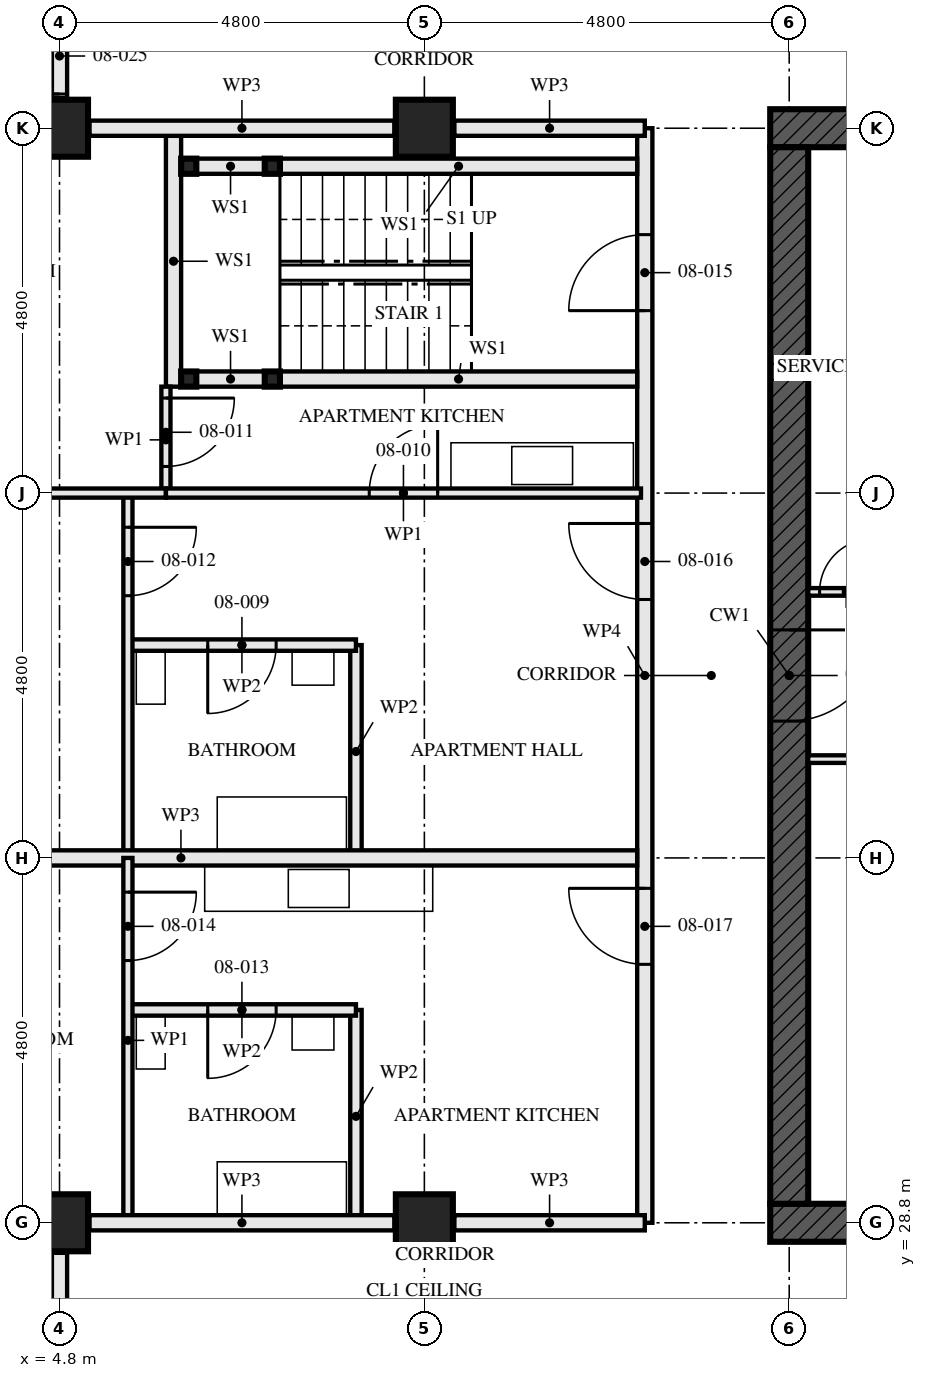
"""IFC4 building model, lengths in metres.
Left out: names, types, materials, properties, quantities, classifications, styles, units other than length and angle.
Written with IfcOpenShell. Run it as: python <this file> out.ifc"""

import sys

from ifc_helpers import new_model, si_unit, direction, frame, frame_2d, origin, origin_2d, place, context, subcontext, project, spatial, rectangle, hollow_rectangle, extrude, element, fill, save


model = new_model("IFC4")
c1 = context("Model", 3, precision=1e-05, world=origin(), true_north=direction((0.0, 1.0)))
c2 = subcontext(c1, "Body", "Model", "MODEL_VIEW")
j1 = project(units=[si_unit("LENGTHUNIT", "METRE"), si_unit("PLANEANGLEUNIT", "RADIAN")], contexts=[c1])
p1 = place(None, origin())
s1 = spatial("IfcSite", under=j1, at=p1, CompositionType="ELEMENT")
p2 = place(p1, origin())
s2 = spatial("IfcBuilding", under=s1, at=p2, CompositionType="ELEMENT")
p3 = place(p2, frame((0.0, 0.0, 34.0)))
s3 = spatial("IfcBuildingStorey", under=s2, at=p3, CompositionType="ELEMENT", Elevation=34.0)
for number, where, z_axis, x_axis in (
    (1, (4.8, 28.8, 0.0), (0.0, 0.0, 1.0), (0.0, 1.0, 0.0)),
    (2, (4.8, 43.2, 0.0), (0.0, 0.0, 1.0), (0.0, 1.0, 0.0)),
    (3, (9.6, 28.8, 0.0), (0.0, 0.0, 1.0), (0.0, 1.0, 0.0)),
    (4, (9.6, 43.2, 0.0), (0.0, 0.0, 1.0), (0.0, 1.0, 0.0)),
):
    element("IfcColumn", number, at=place(p3, frame(where, z_axis=z_axis, x_axis=x_axis)), inside=s3, PredefinedType="COLUMN", context=c2, shape_type="SweptSolid", body=[
        extrude(hollow_rectangle(XDim=0.75, YDim=0.75, WallThickness=0.08, at=origin_2d()), origin(), (0.0, 0.0, 1.0), 3.5),
    ])
p4 = place(p3, frame((14.15, 28.8, -0.17), z_axis=(0.0, 0.0, 1.0), x_axis=(1.0, 0.0, 0.0)))
e5 = element("IfcWall", 5, at=p4, inside=s3, PredefinedType="SHEAR", context=c2, shape_type="SweptSolid", body=[
    extrude(rectangle(XDim=14.9, YDim=0.5, at=frame_2d((7.45, 0.0))), origin(), (0.0, 0.0, 1.0), 3.5),
])
p5 = place(p4, frame((6.85, 0.0, 0.17)))
e6 = element("IfcOpeningElement", 6, at=p5, cuts=e5, PredefinedType="OPENING", context=c2, shape_type="SweptSolid", body=[
    extrude(rectangle(XDim=1.2, YDim=2.1, at=frame_2d((0.6, 1.05))), frame((0.0, 0.26, 0.0), z_axis=(0.0, -1.0, 0.0), x_axis=(1.0, 0.0, 0.0)), (0.0, 0.0, 1.0), 0.521),
])
p6 = place(p3, frame((29.05, 43.2, -0.17), z_axis=(0.0, 0.0, 1.0), x_axis=(-1.0, 0.0, 0.0)))
e7 = element("IfcWall", 7, at=p6, inside=s3, PredefinedType="SHEAR", context=c2, shape_type="SweptSolid", body=[
    extrude(rectangle(XDim=14.9, YDim=0.5, at=frame_2d((7.45, 0.0))), origin(), (0.0, 0.0, 1.0), 3.5),
])
p7 = place(p6, frame((6.85, 0.0, 0.17)))
e8 = element("IfcOpeningElement", 8, at=p7, cuts=e7, PredefinedType="OPENING", context=c2, shape_type="SweptSolid", body=[
    extrude(rectangle(XDim=1.2, YDim=2.1, at=frame_2d((0.6, 1.05))), frame((0.0, 0.26, 0.0), z_axis=(0.0, -1.0, 0.0), x_axis=(1.0, 0.0, 0.0)), (0.0, 0.0, 1.0), 0.521),
])
p8 = place(p3, frame((14.4, 42.95, -0.17), z_axis=(0.0, 0.0, 1.0), x_axis=(0.0, -1.0, 0.0)))
e9 = element("IfcWall", 9, at=p8, inside=s3, PredefinedType="SHEAR", context=c2, shape_type="SweptSolid", body=[
    extrude(rectangle(XDim=13.9, YDim=0.5, at=frame_2d((6.95, 0.0))), origin(), (0.0, 0.0, 1.0), 3.5),
])
p9 = place(p8, frame((6.35, 0.0, 0.17)))
e10 = element("IfcOpeningElement", 10, at=p9, cuts=e9, PredefinedType="OPENING", context=c2, shape_type="SweptSolid", body=[
    extrude(rectangle(XDim=1.2, YDim=2.1, at=frame_2d((0.6, 1.05))), frame((0.0, 0.26, 0.0), z_axis=(0.0, -1.0, 0.0), x_axis=(1.0, 0.0, 0.0)), (0.0, 0.0, 1.0), 0.521),
])
for number, where, z_axis, x_axis in (
    (11, (6.5, 42.7, 0.0), (0.0, 0.0, 1.0), (1.0, 0.0, 0.0)),
    (12, (6.5, 39.9, 0.0), (0.0, 0.0, 1.0), (1.0, 0.0, 0.0)),
    (13, (7.6, 42.7, 0.0), (0.0, 0.0, 1.0), (1.0, 0.0, 0.0)),
    (14, (7.6, 39.9, 0.0), (0.0, 0.0, 1.0), (1.0, 0.0, 0.0)),
):
    element("IfcColumn", number, at=place(p3, frame(where, z_axis=z_axis, x_axis=x_axis)), inside=s3, PredefinedType="COLUMN", context=c2, shape_type="SweptSolid", body=[
        extrude(hollow_rectangle(XDim=0.2, YDim=0.2, WallThickness=0.008, at=origin_2d()), origin(), (0.0, 0.0, 1.0), 3.33),
    ])
p10 = place(p3, frame((4.8, 26.8, 0.0), z_axis=(0.0, 0.0, 1.0), x_axis=(0.0, 1.0, 0.0)))
e15 = element("IfcWall", 15, at=p10, inside=s3, PredefinedType="PARTITIONING", context=c2, shape_type="SweptSolid", body=[
    extrude(rectangle(XDim=1.605, YDim=0.2, at=frame_2d((0.802, 0.0))), origin(), (0.0, 0.0, 1.0), 3.33),
])
p11 = place(p3, frame((6.6, 42.7, 0.0), z_axis=(0.0, 0.0, 1.0), x_axis=(1.0, 0.0, 0.0)))
e16 = element("IfcWall", 16, at=p11, inside=s3, PredefinedType="SOLIDWALL", context=c2, shape_type="SweptSolid", body=[
    extrude(rectangle(XDim=0.9, YDim=0.2, at=frame_2d((0.45, 0.0))), origin(), (0.0, 0.0, 1.0), 2.99),
])
p12 = place(p3, frame((7.7, 42.7, 0.0), z_axis=(0.0, 0.0, 1.0), x_axis=(1.0, 0.0, 0.0)))
e17 = element("IfcWall", 17, at=p12, inside=s3, PredefinedType="SOLIDWALL", context=c2, shape_type="SweptSolid", body=[
    extrude(rectangle(XDim=4.7, YDim=0.2, at=frame_2d((2.35, 0.0))), origin(), (0.0, 0.0, 1.0), 2.99),
])
p13 = place(p3, frame((6.6, 39.9, 0.0), z_axis=(0.0, 0.0, 1.0), x_axis=(1.0, 0.0, 0.0)))
e18 = element("IfcWall", 18, at=p13, inside=s3, PredefinedType="SOLIDWALL", context=c2, shape_type="SweptSolid", body=[
    extrude(rectangle(XDim=0.9, YDim=0.2, at=frame_2d((0.45, 0.0))), origin(), (0.0, 0.0, 1.0), 2.99),
])
p14 = place(p3, frame((7.7, 39.9, 0.0), z_axis=(0.0, 0.0, 1.0), x_axis=(1.0, 0.0, 0.0)))
e19 = element("IfcWall", 19, at=p14, inside=s3, PredefinedType="SOLIDWALL", context=c2, shape_type="SweptSolid", body=[
    extrude(rectangle(XDim=4.7, YDim=0.2, at=frame_2d((2.35, 0.0))), origin(), (0.0, 0.0, 1.0), 2.99),
])
p15 = place(p3, frame((6.3, 43.1, 0.0), z_axis=(0.0, 0.0, 1.0), x_axis=(0.0, -1.0, 0.0)))
e20 = element("IfcWall", 20, at=p15, inside=s3, PredefinedType="SOLIDWALL", context=c2, shape_type="SweptSolid", body=[
    extrude(rectangle(XDim=3.3, YDim=0.2, at=frame_2d((1.65, 0.0))), origin(), (0.0, 0.0, 1.0), 3.33),
])
p16 = place(p3, frame((5.7, 36.4, 0.0), z_axis=(0.0, 0.0, 1.0), x_axis=(1.0, 0.0, 0.0)))
e21 = element("IfcWall", 21, at=p16, inside=s3, PredefinedType="PARTITIONING", context=c2, shape_type="SweptSolid", body=[
    extrude(rectangle(XDim=3.0, YDim=0.15, at=frame_2d((1.5, 0.0))), origin(), (0.0, 0.0, 1.0), 3.33),
])
p17 = place(p16, frame((1.05, 0.0, 0.0)))
e22 = element("IfcOpeningElement", 22, at=p17, cuts=e21, PredefinedType="OPENING", context=c2, shape_type="SweptSolid", body=[
    extrude(rectangle(XDim=0.9, YDim=2.1, at=frame_2d((0.45, 1.05))), frame((0.0, 0.085, 0.0), z_axis=(0.0, -1.0, 0.0), x_axis=(1.0, 0.0, 0.0)), (0.0, 0.0, 1.0), 0.171),
])
p18 = place(p3, frame((8.7, 36.4, 0.0), z_axis=(0.0, 0.0, 1.0), x_axis=(0.0, -1.0, 0.0)))
e23 = element("IfcWall", 23, at=p18, inside=s3, PredefinedType="PARTITIONING", context=c2, shape_type="SweptSolid", body=[
    extrude(rectangle(XDim=2.8, YDim=0.15, at=frame_2d((1.4, 0.0))), origin(), (0.0, 0.0, 1.0), 3.33),
])
p19 = place(p3, frame((6.2, 38.4, 0.0), z_axis=(0.0, 0.0, 1.0), x_axis=(1.0, 0.0, 0.0)))
e24 = element("IfcWall", 24, at=p19, inside=s3, PredefinedType="PARTITIONING", context=c2, shape_type="SweptSolid", body=[
    extrude(rectangle(XDim=6.25, YDim=0.12, at=frame_2d((3.125, 0.0))), origin(), (0.0, 0.0, 1.0), 2.55),
])
p20 = place(p19, frame((2.675, 0.0, 0.0)))
e25 = element("IfcOpeningElement", 25, at=p20, cuts=e24, PredefinedType="OPENING", context=c2, shape_type="SweptSolid", body=[
    extrude(rectangle(XDim=0.9, YDim=2.1, at=frame_2d((0.45, 1.05))), frame((0.0, 0.071, 0.0), z_axis=(0.0, -1.0, 0.0), x_axis=(1.0, 0.0, 0.0)), (0.0, 0.0, 1.0), 0.141),
])
p21 = place(p3, frame((6.2, 39.8, 0.0), z_axis=(0.0, 0.0, 1.0), x_axis=(0.0, -1.0, 0.0)))
e26 = element("IfcWall", 26, at=p21, inside=s3, PredefinedType="PARTITIONING", context=c2, shape_type="SweptSolid", body=[
    extrude(rectangle(XDim=1.4, YDim=0.12, at=frame_2d((0.7, 0.0))), origin(), (0.0, 0.0, 1.0), 3.33),
])
p22 = place(p21, frame((0.15, 0.0, 0.0)))
e27 = element("IfcOpeningElement", 27, at=p22, cuts=e26, PredefinedType="OPENING", context=c2, shape_type="SweptSolid", body=[
    extrude(rectangle(XDim=0.9, YDim=2.1, at=frame_2d((0.45, 1.05))), frame((0.0, 0.071, 0.0), z_axis=(0.0, -1.0, 0.0), x_axis=(1.0, 0.0, 0.0)), (0.0, 0.0, 1.0), 0.141),
])
p23 = place(p3, frame((5.7, 38.4, 0.0), z_axis=(0.0, 0.0, 1.0), x_axis=(0.0, -1.0, 0.0)))
e28 = element("IfcWall", 28, at=p23, inside=s3, PredefinedType="PARTITIONING", context=c2, shape_type="SweptSolid", body=[
    extrude(rectangle(XDim=4.8, YDim=0.12, at=frame_2d((2.4, 0.0))), origin(), (0.0, 0.0, 1.0), 3.33),
])
p24 = place(p23, frame((0.45, 0.0, 0.0)))
e29 = element("IfcOpeningElement", 29, at=p24, cuts=e28, PredefinedType="OPENING", context=c2, shape_type="SweptSolid", body=[
    extrude(rectangle(XDim=0.9, YDim=2.1, at=frame_2d((0.45, 1.05))), frame((0.0, 0.071, 0.0), z_axis=(0.0, -1.0, 0.0), x_axis=(1.0, 0.0, 0.0)), (0.0, 0.0, 1.0), 0.141),
])
p25 = place(p3, frame((0.395, 38.4, 0.0), z_axis=(0.0, 0.0, 1.0), x_axis=(1.0, 0.0, 0.0)))
e30 = element("IfcWall", 30, at=p25, inside=s3, PredefinedType="PARTITIONING", context=c2, shape_type="SweptSolid", body=[
    extrude(rectangle(XDim=5.805, YDim=0.12, at=frame_2d((2.902, 0.0))), origin(), (0.0, 0.0, 1.0), 2.55),
])
p26 = place(p3, frame((0.395, 33.6, 0.0), z_axis=(0.0, 0.0, 1.0), x_axis=(1.0, 0.0, 0.0)))
e31 = element("IfcWall", 31, at=p26, inside=s3, PredefinedType="PARTITIONING", context=c2, shape_type="SweptSolid", body=[
    extrude(rectangle(XDim=12.005, YDim=0.2, at=frame_2d((6.002, 0.0))), origin(), (0.0, 0.0, 1.0), 2.55),
])
p27 = place(p3, frame((5.7, 31.6, 0.0), z_axis=(0.0, 0.0, 1.0), x_axis=(1.0, 0.0, 0.0)))
e32 = element("IfcWall", 32, at=p27, inside=s3, PredefinedType="PARTITIONING", context=c2, shape_type="SweptSolid", body=[
    extrude(rectangle(XDim=3.0, YDim=0.15, at=frame_2d((1.5, 0.0))), origin(), (0.0, 0.0, 1.0), 3.33),
])
p28 = place(p27, frame((1.05, 0.0, 0.0)))
e33 = element("IfcOpeningElement", 33, at=p28, cuts=e32, PredefinedType="OPENING", context=c2, shape_type="SweptSolid", body=[
    extrude(rectangle(XDim=0.9, YDim=2.1, at=frame_2d((0.45, 1.05))), frame((0.0, 0.085, 0.0), z_axis=(0.0, -1.0, 0.0), x_axis=(1.0, 0.0, 0.0)), (0.0, 0.0, 1.0), 0.171),
])
p29 = place(p3, frame((8.7, 31.6, 0.0), z_axis=(0.0, 0.0, 1.0), x_axis=(0.0, -1.0, 0.0)))
e34 = element("IfcWall", 34, at=p29, inside=s3, PredefinedType="PARTITIONING", context=c2, shape_type="SweptSolid", body=[
    extrude(rectangle(XDim=2.8, YDim=0.15, at=frame_2d((1.4, 0.0))), origin(), (0.0, 0.0, 1.0), 3.33),
])
p30 = place(p3, frame((5.7, 33.6, 0.0), z_axis=(0.0, 0.0, 1.0), x_axis=(0.0, -1.0, 0.0)))
e35 = element("IfcWall", 35, at=p30, inside=s3, PredefinedType="PARTITIONING", context=c2, shape_type="SweptSolid", body=[
    extrude(rectangle(XDim=4.8, YDim=0.12, at=frame_2d((2.4, 0.0))), origin(), (0.0, 0.0, 1.0), 3.33),
])
p31 = place(p30, frame((0.45, 0.0, 0.0)))
e36 = element("IfcOpeningElement", 36, at=p31, cuts=e35, PredefinedType="OPENING", context=c2, shape_type="SweptSolid", body=[
    extrude(rectangle(XDim=0.9, YDim=2.1, at=frame_2d((0.45, 1.05))), frame((0.0, 0.071, 0.0), z_axis=(0.0, -1.0, 0.0), x_axis=(1.0, 0.0, 0.0)), (0.0, 0.0, 1.0), 0.141),
])
p32 = place(p3, frame((12.5, 43.2, 0.0), z_axis=(0.0, 0.0, 1.0), x_axis=(0.0, -1.0, 0.0)))
e37 = element("IfcWall", 37, at=p32, inside=s3, PredefinedType="PARTITIONING", context=c2, shape_type="SweptSolid", body=[
    extrude(rectangle(XDim=14.4, YDim=0.2, at=frame_2d((7.2, 0.0))), origin(), (0.0, 0.0, 1.0), 2.55),
])
p33 = place(p32, frame((1.4, 0.0, 0.0)))
e38 = element("IfcOpeningElement", 38, at=p33, cuts=e37, PredefinedType="OPENING", context=c2, shape_type="SweptSolid", body=[
    extrude(rectangle(XDim=1.0, YDim=2.1, at=frame_2d((0.5, 1.05))), frame((0.0, 0.111, 0.0), z_axis=(0.0, -1.0, 0.0), x_axis=(1.0, 0.0, 0.0)), (0.0, 0.0, 1.0), 0.221),
])
p34 = place(p32, frame((5.2, 0.0, 0.0)))
e39 = element("IfcOpeningElement", 39, at=p34, cuts=e37, PredefinedType="OPENING", context=c2, shape_type="SweptSolid", body=[
    extrude(rectangle(XDim=1.0, YDim=2.1, at=frame_2d((0.5, 1.05))), frame((0.0, 0.111, 0.0), z_axis=(0.0, -1.0, 0.0), x_axis=(1.0, 0.0, 0.0)), (0.0, 0.0, 1.0), 0.221),
])
p35 = place(p32, frame((10.0, 0.0, 0.0)))
e40 = element("IfcOpeningElement", 40, at=p35, cuts=e37, PredefinedType="OPENING", context=c2, shape_type="SweptSolid", body=[
    extrude(rectangle(XDim=1.0, YDim=2.1, at=frame_2d((0.5, 1.05))), frame((0.0, 0.111, 0.0), z_axis=(0.0, -1.0, 0.0), x_axis=(1.0, 0.0, 0.0)), (0.0, 0.0, 1.0), 0.221),
])
p36 = place(p3, frame((4.8, 45.2, 0.0), z_axis=(0.0, 0.0, 1.0), x_axis=(0.0, -1.0, 0.0)))
e41 = element("IfcWall", 41, at=p36, inside=s3, PredefinedType="PARTITIONING", context=c2, shape_type="SweptSolid", body=[
    extrude(rectangle(XDim=1.605, YDim=0.2, at=frame_2d((0.802, 0.0))), origin(), (0.0, 0.0, 1.0), 3.33),
])
p37 = place(p36, frame((0.55, 0.0, 0.0)))
e42 = element("IfcOpeningElement", 42, at=p37, cuts=e41, PredefinedType="OPENING", context=c2, shape_type="SweptSolid", body=[
    extrude(rectangle(XDim=1.0, YDim=2.1, at=frame_2d((0.5, 1.05))), frame((0.0, 0.111, 0.0), z_axis=(0.0, -1.0, 0.0), x_axis=(1.0, 0.0, 0.0)), (0.0, 0.0, 1.0), 0.221),
])
p38 = place(p3, frame((14.65, 34.9, 0.0), z_axis=(0.0, 0.0, 1.0), x_axis=(1.0, 0.0, 0.0)))
e43 = element("IfcWall", 43, at=p38, inside=s3, PredefinedType="SOLIDWALL", context=c2, shape_type="SweptSolid", body=[
    extrude(rectangle(XDim=5.9, YDim=0.1, at=frame_2d((2.95, 0.0))), origin(), (0.0, 0.0, 1.0), 3.33),
])
p39 = place(p38, frame((1.6, 0.0, 0.0)))
e44 = element("IfcOpeningElement", 44, at=p39, cuts=e43, PredefinedType="OPENING", context=c2, shape_type="SweptSolid", body=[
    extrude(rectangle(XDim=0.7, YDim=2.1, at=frame_2d((0.35, 1.05))), frame((0.0, 0.061, 0.0), z_axis=(0.0, -1.0, 0.0), x_axis=(1.0, 0.0, 0.0)), (0.0, 0.0, 1.0), 0.121),
])
p40 = place(p3, frame((14.65, 37.1, 0.0), z_axis=(0.0, 0.0, 1.0), x_axis=(1.0, 0.0, 0.0)))
e45 = element("IfcWall", 45, at=p40, inside=s3, PredefinedType="SOLIDWALL", context=c2, shape_type="SweptSolid", body=[
    extrude(rectangle(XDim=5.9, YDim=0.1, at=frame_2d((2.95, 0.0))), origin(), (0.0, 0.0, 1.0), 3.33),
])
p41 = place(p40, frame((0.15, 0.0, 0.0)))
e46 = element("IfcOpeningElement", 46, at=p41, cuts=e45, PredefinedType="OPENING", context=c2, shape_type="SweptSolid", body=[
    extrude(rectangle(XDim=0.7, YDim=2.1, at=frame_2d((0.35, 1.05))), frame((0.0, 0.061, 0.0), z_axis=(0.0, -1.0, 0.0), x_axis=(1.0, 0.0, 0.0)), (0.0, 0.0, 1.0), 0.121),
])
p42 = place(p40, frame((1.5, 0.0, 0.0)))
e47 = element("IfcOpeningElement", 47, at=p42, cuts=e45, PredefinedType="OPENING", context=c2, shape_type="SweptSolid", body=[
    extrude(rectangle(XDim=0.9, YDim=2.1, at=frame_2d((0.45, 1.05))), frame((0.0, 0.061, 0.0), z_axis=(0.0, -1.0, 0.0), x_axis=(1.0, 0.0, 0.0)), (0.0, 0.0, 1.0), 0.121),
])
p43 = place(p3, frame((12.5, 28.8, 0.0), z_axis=(0.0, 0.0, 1.0), x_axis=(-1.0, 0.0, 0.0)))
e48 = element("IfcWall", 48, at=p43, inside=s3, PredefinedType="PARTITIONING", context=c2, shape_type="SweptSolid", body=[
    extrude(rectangle(XDim=2.505, YDim=0.2, at=frame_2d((1.252, 0.0))), origin(), (0.0, 0.0, 1.0), 2.32),
])
p44 = place(p3, frame((9.205, 28.8, 0.0), z_axis=(0.0, 0.0, 1.0), x_axis=(-1.0, 0.0, 0.0)))
e49 = element("IfcWall", 49, at=p44, inside=s3, PredefinedType="PARTITIONING", context=c2, shape_type="SweptSolid", body=[
    extrude(rectangle(XDim=4.01, YDim=0.2, at=frame_2d((2.005, 0.0))), origin(), (0.0, 0.0, 1.0), 2.32),
])
p45 = place(p3, frame((12.5, 43.2, 0.0), z_axis=(0.0, 0.0, 1.0), x_axis=(-1.0, 0.0, 0.0)))
e50 = element("IfcWall", 50, at=p45, inside=s3, PredefinedType="PARTITIONING", context=c2, shape_type="SweptSolid", body=[
    extrude(rectangle(XDim=2.505, YDim=0.2, at=frame_2d((1.252, 0.0))), origin(), (0.0, 0.0, 1.0), 2.32),
])
p46 = place(p3, frame((9.205, 43.2, 0.0), z_axis=(0.0, 0.0, 1.0), x_axis=(-1.0, 0.0, 0.0)))
e51 = element("IfcWall", 51, at=p46, inside=s3, PredefinedType="PARTITIONING", context=c2, shape_type="SweptSolid", body=[
    extrude(rectangle(XDim=4.01, YDim=0.2, at=frame_2d((2.005, 0.0))), origin(), (0.0, 0.0, 1.0), 2.32),
])
p47 = place(p17, frame((0.9, 0.0, 0.0), z_axis=(0.0, 0.0, 1.0), x_axis=(-1.0, 0.0, 0.0)))
e52 = element("IfcDoor", 52, at=p47, inside=s3, OperationType="SINGLE_SWING_LEFT", PredefinedType="DOOR", context=c2, shape_type="SweptSolid", body=[
    extrude(rectangle(XDim=0.9, YDim=2.1, at=frame_2d((0.45, 1.05))), frame((0.0, 0.022, 0.0), z_axis=(0.0, -1.0, 0.0), x_axis=(1.0, 0.0, 0.0)), (0.0, 0.0, 1.0), 0.044),
])
fill(e22, e52)
p48 = place(p20, origin())
e53 = element("IfcDoor", 53, at=p48, inside=s3, OperationType="SINGLE_SWING_LEFT", PredefinedType="DOOR", context=c2, shape_type="SweptSolid", body=[
    extrude(rectangle(XDim=0.9, YDim=2.1, at=frame_2d((0.45, 1.05))), frame((0.0, 0.022, 0.0), z_axis=(0.0, -1.0, 0.0), x_axis=(1.0, 0.0, 0.0)), (0.0, 0.0, 1.0), 0.044),
])
fill(e25, e53)
p49 = place(p22, origin())
e54 = element("IfcDoor", 54, at=p49, inside=s3, OperationType="SINGLE_SWING_RIGHT", PredefinedType="DOOR", context=c2, shape_type="SweptSolid", body=[
    extrude(rectangle(XDim=0.9, YDim=2.1, at=frame_2d((0.45, 1.05))), frame((0.0, 0.022, 0.0), z_axis=(0.0, -1.0, 0.0), x_axis=(1.0, 0.0, 0.0)), (0.0, 0.0, 1.0), 0.044),
])
fill(e27, e54)
p50 = place(p24, origin())
e55 = element("IfcDoor", 55, at=p50, inside=s3, OperationType="SINGLE_SWING_RIGHT", PredefinedType="DOOR", context=c2, shape_type="SweptSolid", body=[
    extrude(rectangle(XDim=0.9, YDim=2.1, at=frame_2d((0.45, 1.05))), frame((0.0, 0.022, 0.0), z_axis=(0.0, -1.0, 0.0), x_axis=(1.0, 0.0, 0.0)), (0.0, 0.0, 1.0), 0.044),
])
fill(e29, e55)
p51 = place(p28, frame((0.9, 0.0, 0.0), z_axis=(0.0, 0.0, 1.0), x_axis=(-1.0, 0.0, 0.0)))
e56 = element("IfcDoor", 56, at=p51, inside=s3, OperationType="SINGLE_SWING_LEFT", PredefinedType="DOOR", context=c2, shape_type="SweptSolid", body=[
    extrude(rectangle(XDim=0.9, YDim=2.1, at=frame_2d((0.45, 1.05))), frame((0.0, 0.022, 0.0), z_axis=(0.0, -1.0, 0.0), x_axis=(1.0, 0.0, 0.0)), (0.0, 0.0, 1.0), 0.044),
])
fill(e33, e56)
p52 = place(p31, origin())
e57 = element("IfcDoor", 57, at=p52, inside=s3, OperationType="SINGLE_SWING_RIGHT", PredefinedType="DOOR", context=c2, shape_type="SweptSolid", body=[
    extrude(rectangle(XDim=0.9, YDim=2.1, at=frame_2d((0.45, 1.05))), frame((0.0, 0.022, 0.0), z_axis=(0.0, -1.0, 0.0), x_axis=(1.0, 0.0, 0.0)), (0.0, 0.0, 1.0), 0.044),
])
fill(e36, e57)
p53 = place(p33, frame((1.0, 0.0, 0.0), z_axis=(0.0, 0.0, 1.0), x_axis=(-1.0, 0.0, 0.0)))
e58 = element("IfcDoor", 58, at=p53, inside=s3, OperationType="SINGLE_SWING_RIGHT", PredefinedType="DOOR", context=c2, shape_type="SweptSolid", body=[
    extrude(rectangle(XDim=1.0, YDim=2.1, at=frame_2d((0.5, 1.05))), frame((0.0, 0.032, 0.0), z_axis=(0.0, -1.0, 0.0), x_axis=(1.0, 0.0, 0.0)), (0.0, 0.0, 1.0), 0.064),
])
fill(e38, e58)
p54 = place(p34, frame((1.0, 0.0, 0.0), z_axis=(0.0, 0.0, 1.0), x_axis=(-1.0, 0.0, 0.0)))
e59 = element("IfcDoor", 59, at=p54, inside=s3, OperationType="SINGLE_SWING_LEFT", PredefinedType="DOOR", context=c2, shape_type="SweptSolid", body=[
    extrude(rectangle(XDim=1.0, YDim=2.1, at=frame_2d((0.5, 1.05))), frame((0.0, 0.027, 0.0), z_axis=(0.0, -1.0, 0.0), x_axis=(1.0, 0.0, 0.0)), (0.0, 0.0, 1.0), 0.054),
])
fill(e39, e59)
p55 = place(p35, frame((1.0, 0.0, 0.0), z_axis=(0.0, 0.0, 1.0), x_axis=(-1.0, 0.0, 0.0)))
e60 = element("IfcDoor", 60, at=p55, inside=s3, OperationType="SINGLE_SWING_LEFT", PredefinedType="DOOR", context=c2, shape_type="SweptSolid", body=[
    extrude(rectangle(XDim=1.0, YDim=2.1, at=frame_2d((0.5, 1.05))), frame((0.0, 0.027, 0.0), z_axis=(0.0, -1.0, 0.0), x_axis=(1.0, 0.0, 0.0)), (0.0, 0.0, 1.0), 0.054),
])
fill(e40, e60)
p56 = place(p37, frame((1.0, 0.0, 0.0), z_axis=(0.0, 0.0, 1.0), x_axis=(-1.0, 0.0, 0.0)))
e61 = element("IfcDoor", 61, at=p56, inside=s3, OperationType="SINGLE_SWING_RIGHT", PredefinedType="DOOR", context=c2, shape_type="SweptSolid", body=[
    extrude(rectangle(XDim=1.0, YDim=2.1, at=frame_2d((0.5, 1.05))), frame((0.0, 0.027, 0.0), z_axis=(0.0, -1.0, 0.0), x_axis=(1.0, 0.0, 0.0)), (0.0, 0.0, 1.0), 0.054),
])
fill(e42, e61)
p57 = place(p41, origin())
e62 = element("IfcDoor", 62, at=p57, inside=s3, OperationType="SINGLE_SWING_LEFT", PredefinedType="DOOR", context=c2, shape_type="SweptSolid", body=[
    extrude(rectangle(XDim=0.7, YDim=2.1, at=frame_2d((0.35, 1.05))), frame((0.0, 0.027, 0.0), z_axis=(0.0, -1.0, 0.0), x_axis=(1.0, 0.0, 0.0)), (0.0, 0.0, 1.0), 0.054),
])
fill(e46, e62)
p58 = place(p9, origin())
e63 = element("IfcDoor", 63, at=p58, inside=s3, OperationType="SINGLE_SWING_LEFT", PredefinedType="DOOR", context=c2, shape_type="SweptSolid", body=[
    extrude(rectangle(XDim=1.2, YDim=2.1, at=frame_2d((0.6, 1.05))), frame((0.0, 0.027, 0.0), z_axis=(0.0, -1.0, 0.0), x_axis=(1.0, 0.0, 0.0)), (0.0, 0.0, 1.0), 0.054),
])
fill(e10, e63)
save(model, sys.argv[1])
